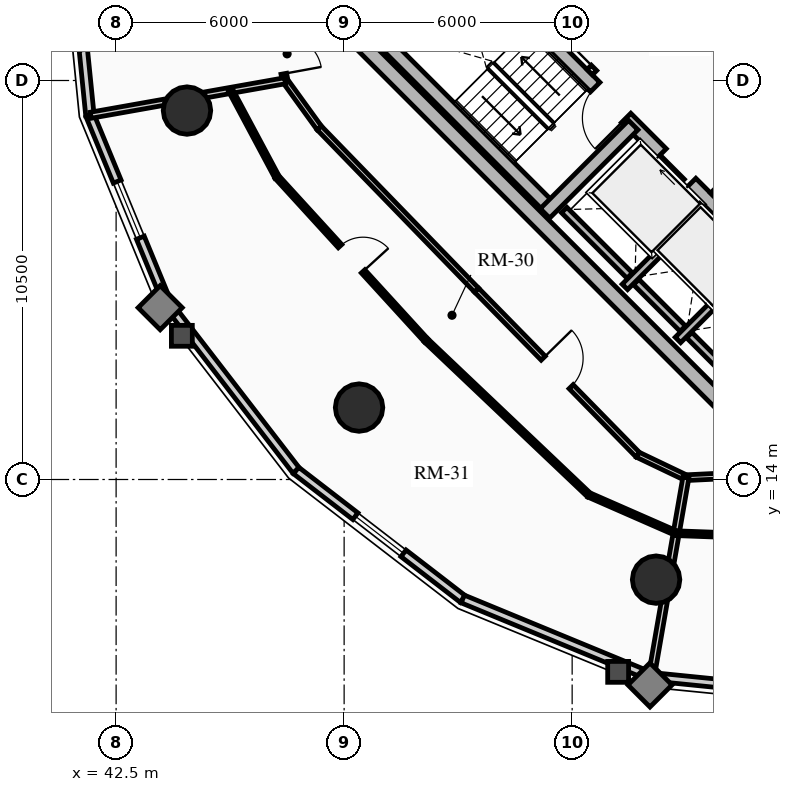
"""IFC4 building model, lengths in metres.
Left out: names, types, materials, properties, quantities, classifications, styles, units other than length and angle.
Written with IfcOpenShell. Run it as: python <this file> out.ifc"""

import sys

from ifc_helpers import new_model, si_unit, direction, frame, frame_2d, origin, origin_2d, place, context, subcontext, project, spatial, rectangle, circle, extrude, source, transform, mapped, element, fill, save


model = new_model("IFC4")
c1 = context("Model", 3, precision=1e-05, world=origin(), true_north=direction((0.0, 1.0)))
c2 = subcontext(c1, "Body", "Model", "MODEL_VIEW")
j1 = project(units=[si_unit("LENGTHUNIT", "METRE"), si_unit("PLANEANGLEUNIT", "RADIAN")], contexts=[c1])
p1 = place(None, origin())
s1 = spatial("IfcSite", under=j1, at=p1, CompositionType="ELEMENT")
p2 = place(p1, origin())
s2 = spatial("IfcBuilding", under=s1, at=p2, CompositionType="ELEMENT")
p3 = place(p2, frame((0.0, 0.0, 160.33)))
s3 = spatial("IfcBuildingStorey", under=s2, at=p3, CompositionType="ELEMENT", Elevation=160.33)
for number, where, z_axis, x_axis in (
    (1, (58.702, 15.732, 0.0), (0.0, 0.0, 1.0), (-0.707, 0.707, 0.0)),
    (2, (66.268, 23.298, 0.0), (0.0, 0.0, 1.0), (-0.707, 0.707, 0.0)),
):
    element("IfcWall", number, at=place(p3, frame(where, z_axis=z_axis, x_axis=x_axis)), inside=s3, PredefinedType="SHEAR", context=c2, shape_type="SweptSolid", body=[
        extrude(rectangle(XDim=14.1, YDim=0.4, at=frame_2d((7.05, 0.0))), origin(), (0.0, 0.0, 1.0), 2.91),
    ])
p4 = place(p3, frame((61.06, 18.373, 0.0), z_axis=(0.0, 0.0, 1.0), x_axis=(-0.707106781187, 0.707106781187, 0.0)))
e3 = element("IfcWall", 3, at=p4, inside=s3, PredefinedType="SHEAR", context=c2, shape_type="SweptSolid", body=[
    extrude(rectangle(XDim=13.7, YDim=0.35, at=frame_2d((6.85, 0.0))), origin(), (0.0, 0.0, 1.0), 2.91),
])
m1 = source(origin(), c2, "Body", "SweptSolid", [
    extrude(rectangle(XDim=1.1, YDim=2.015, at=frame_2d((0.55, 1.007))), frame((0.0, 0.185, 0.0), z_axis=(0.0, -1.0, 0.0), x_axis=(1.0, 0.0, 0.0)), (0.0, 0.0, 1.0), 0.37),
])
p5 = place(p4, frame((4.85, 0.0, 0.0)))
e4 = element("IfcOpeningElement", 4, at=p5, cuts=e3, PredefinedType="OPENING", context=c2, shape_type="MappedRepresentation", body=[
    mapped(m1, transform((0.0, 0.0, 0.0), x_axis=(1.0, 0.0, 0.0), y_axis=(0.0, 1.0, 0.0), z_axis=(0.0, 0.0, 1.0), scale=1.0)),
])
p6 = place(p4, frame((0.625, 0.0, 0.0)))
e5 = element("IfcOpeningElement", 5, at=p6, cuts=e3, PredefinedType="OPENING", context=c2, shape_type="MappedRepresentation", body=[
    mapped(m1, transform((0.0, 0.0, 0.0), x_axis=(1.0, 0.0, 0.0), y_axis=(0.0, 1.0, 0.0), z_axis=(0.0, 0.0, 1.0), scale=1.0)),
])
p7 = place(p4, frame((2.625, 0.0, 0.0)))
e6 = element("IfcOpeningElement", 6, at=p7, cuts=e3, PredefinedType="OPENING", context=c2, shape_type="MappedRepresentation", body=[
    mapped(m1, transform((0.0, 0.0, 0.0), x_axis=(1.0, 0.0, 0.0), y_axis=(0.0, 1.0, 0.0), z_axis=(0.0, 0.0, 1.0), scale=1.0)),
])
m2 = source(origin(), c2, "Body", "SweptSolid", [
    extrude(rectangle(XDim=1.15, YDim=2.02, at=frame_2d((0.575, 1.01))), frame((0.0, 0.185, 0.0), z_axis=(0.0, -1.0, 0.0), x_axis=(1.0, 0.0, 0.0)), (0.0, 0.0, 1.0), 0.37),
])
p8 = place(p4, frame((7.27, 0.0, 0.0)))
e7 = element("IfcOpeningElement", 7, at=p8, cuts=e3, PredefinedType="OPENING", context=c2, shape_type="MappedRepresentation", body=[
    mapped(m2, transform((0.0, 0.0, 0.0), x_axis=(1.0, 0.0, 0.0), y_axis=(0.0, 1.0, 0.0), z_axis=(0.0, 0.0, 1.0), scale=1.0)),
])
p9 = place(p3, frame((63.627, 20.94, 0.0), z_axis=(0.0, 0.0, 1.0), x_axis=(-0.707119496762, 0.707094065383, 0.0)))
e8 = element("IfcWall", 8, at=p9, inside=s3, PredefinedType="SHEAR", context=c2, shape_type="SweptSolid", body=[
    extrude(rectangle(XDim=9.6, YDim=0.35, at=frame_2d((4.8, 0.0))), origin(), (0.0, 0.0, 1.0), 2.91),
])
p10 = place(p9, frame((5.28, 0.0, 0.0)))
e9 = element("IfcOpeningElement", 9, at=p10, cuts=e8, PredefinedType="OPENING", context=c2, shape_type="MappedRepresentation", body=[
    mapped(m2, transform((0.0, 0.0, 0.0), x_axis=(1.0, 0.0, 0.0), y_axis=(0.0, 1.0, 0.0), z_axis=(0.0, 0.0, 1.0), scale=1.0)),
])
p11 = place(p3, frame((53.922, 21.141, 0.0), z_axis=(0.0, 0.0, 1.0), x_axis=(-0.707106781187, 0.707106781187, 0.0)))
e10 = element("IfcWall", 10, at=p11, inside=s3, PredefinedType="SHEAR", context=c2, shape_type="SweptSolid", body=[
    extrude(rectangle(XDim=6.695, YDim=0.35, at=frame_2d((3.348, 0.0))), origin(), (0.0, 0.0, 1.0), 2.91),
])
p12 = place(p3, frame((53.784, 21.003, 0.0), z_axis=(0.0, 0.0, 1.0), x_axis=(0.707106781187, 0.707106781187, 0.0)))
e11 = element("IfcWall", 11, at=p12, inside=s3, PredefinedType="SHEAR", context=c2, shape_type="SweptSolid", body=[
    extrude(rectangle(XDim=3.285, YDim=0.35, at=frame_2d((1.643, 0.0))), origin(), (0.0, 0.0, 1.0), 2.91),
])
for number, where, z_axis, x_axis in (
    (12, (44.365, 23.709, 0.0), (0.0, 0.0, 1.0), (1.0, 0.0, 0.0)),
    (13, (48.893, 15.893, 0.0), (0.0, 0.0, 1.0), (1.0, 0.0, 0.0)),
    (14, (56.709, 11.365, 0.0), (0.0, 0.0, 1.0), (1.0, 0.0, 0.0)),
):
    element("IfcColumn", number, at=place(p3, frame(where, z_axis=z_axis, x_axis=x_axis)), inside=s3, PredefinedType="USERDEFINED", context=c2, shape_type="SweptSolid", body=[
        extrude(circle(Radius=0.625, at=origin_2d()), origin(), (0.0, 0.0, 1.0), 2.91),
    ])
p13 = place(p3, frame((41.811, 23.582, 0.0), z_axis=(0.0, 0.0, 1.0), x_axis=(-0.100279889424, 0.994959267396, 0.0)))
e15 = element("IfcWall", 15, at=p13, inside=s3, PredefinedType="SOLIDWALL", context=c2, shape_type="SweptSolid", body=[
    extrude(rectangle(XDim=5.076, YDim=0.22, at=frame_2d((2.538, 0.0))), origin(), (0.0, 0.0, 1.0), 2.245),
])
m3 = source(origin(), c2, "Body", "SweptSolid", [
    extrude(rectangle(XDim=1.6, YDim=1.3, at=frame_2d((0.8, 0.65))), frame((0.0, 0.12, 0.0), z_axis=(0.0, -1.0, 0.0), x_axis=(1.0, 0.0, 0.0)), (0.0, 0.0, 1.0), 0.24),
])
p14 = place(p13, frame((1.738, 0.0, 0.65)))
e16 = element("IfcOpeningElement", 16, at=p14, cuts=e15, PredefinedType="OPENING", context=c2, shape_type="MappedRepresentation", body=[
    mapped(m3, transform((0.0, 0.0, 0.0), x_axis=(1.0, 0.0, 0.0), y_axis=(0.0, 1.0, 0.0), z_axis=(0.0, 0.0, 1.0), scale=1.0)),
])
p15 = place(p3, frame((43.856, 18.622, 0.0), z_axis=(0.0, 0.0, 1.0), x_axis=(-0.38111364655, 0.924528197738, 0.0)))
e17 = element("IfcWall", 17, at=p15, inside=s3, PredefinedType="SOLIDWALL", context=c2, shape_type="SweptSolid", body=[
    extrude(rectangle(XDim=5.366, YDim=0.22, at=frame_2d((2.683, 0.0))), origin(), (0.0, 0.0, 1.0), 2.245),
])
p16 = place(p15, frame((1.883, 0.0, 0.65)))
e18 = element("IfcOpeningElement", 18, at=p16, cuts=e17, PredefinedType="OPENING", context=c2, shape_type="MappedRepresentation", body=[
    mapped(m3, transform((0.0, 0.0, 0.0), x_axis=(1.0, 0.0, 0.0), y_axis=(0.0, 1.0, 0.0), z_axis=(0.0, 0.0, 1.0), scale=1.0)),
])
p17 = place(p3, frame((47.236, 14.236, 0.0), z_axis=(0.0, 0.0, 1.0), x_axis=(-0.610543584779, 0.791982658323, 0.0)))
e19 = element("IfcWall", 19, at=p17, inside=s3, PredefinedType="SOLIDWALL", context=c2, shape_type="SweptSolid", body=[
    extrude(rectangle(XDim=5.537, YDim=0.22, at=frame_2d((2.769, 0.0))), origin(), (0.0, 0.0, 1.0), 2.245),
])
p18 = place(p3, frame((51.622, 10.856, 0.0), z_axis=(0.0, 0.0, 1.0), x_axis=(-0.791982658323, 0.610543584779, 0.0)))
e20 = element("IfcWall", 20, at=p18, inside=s3, PredefinedType="SOLIDWALL", context=c2, shape_type="SweptSolid", body=[
    extrude(rectangle(XDim=5.537, YDim=0.22, at=frame_2d((2.769, 0.0))), origin(), (0.0, 0.0, 1.0), 2.245),
])
p19 = place(p18, frame((1.968, 0.0, 0.65)))
e21 = element("IfcOpeningElement", 21, at=p19, cuts=e20, PredefinedType="OPENING", context=c2, shape_type="MappedRepresentation", body=[
    mapped(m3, transform((0.0, 0.0, 0.0), x_axis=(1.0, 0.0, 0.0), y_axis=(0.0, 1.0, 0.0), z_axis=(0.0, 0.0, 1.0), scale=1.0)),
])
p20 = place(p3, frame((56.582, 8.811, 0.0), z_axis=(0.0, 0.0, 1.0), x_axis=(-0.924528197738, 0.38111364655, 0.0)))
e22 = element("IfcWall", 22, at=p20, inside=s3, PredefinedType="SOLIDWALL", context=c2, shape_type="SweptSolid", body=[
    extrude(rectangle(XDim=5.366, YDim=0.22, at=frame_2d((2.683, 0.0))), origin(), (0.0, 0.0, 1.0), 2.245),
])
p21 = place(p3, frame((61.633, 8.302, 0.0), z_axis=(0.0, 0.0, 1.0), x_axis=(-0.994959267396, 0.100279889424, 0.0)))
e23 = element("IfcWall", 23, at=p21, inside=s3, PredefinedType="SOLIDWALL", context=c2, shape_type="SweptSolid", body=[
    extrude(rectangle(XDim=5.076, YDim=0.22, at=frame_2d((2.538, 0.0))), origin(), (0.0, 0.0, 1.0), 2.245),
])
p22 = place(p21, frame((1.738, 0.0, 0.65)))
e24 = element("IfcOpeningElement", 24, at=p22, cuts=e23, PredefinedType="OPENING", context=c2, shape_type="MappedRepresentation", body=[
    mapped(m3, transform((0.0, 0.0, 0.0), x_axis=(1.0, 0.0, 0.0), y_axis=(0.0, 1.0, 0.0), z_axis=(0.0, 0.0, 1.0), scale=1.0)),
])
p23 = place(p3, frame((55.888, 19.069, 0.0), z_axis=(0.0, 0.0, 1.0), x_axis=(0.707106781187, 0.707106781187, 0.0)))
e25 = element("IfcWall", 25, at=p23, inside=s3, PredefinedType="SHEAR", context=c2, shape_type="SweptSolid", body=[
    extrude(rectangle(XDim=2.97, YDim=0.2, at=frame_2d((1.485, 0.0))), origin(), (0.0, 0.0, 1.0), 2.91),
])
p24 = place(p3, frame((56.015, 19.366, 0.0), z_axis=(0.0, 0.0, 1.0), x_axis=(-0.707106781187, 0.707106781187, 0.0)))
e26 = element("IfcWall", 26, at=p24, inside=s3, PredefinedType="SHEAR", context=c2, shape_type="SweptSolid", body=[
    extrude(rectangle(XDim=2.44, YDim=0.2, at=frame_2d((1.22, 0.0))), origin(), (0.0, 0.0, 1.0), 2.91),
])
p25 = place(p3, frame((57.284, 17.673, 0.0), z_axis=(0.0, 0.0, 1.0), x_axis=(0.707147878904, 0.70706568108, 0.0)))
e27 = element("IfcWall", 27, at=p25, inside=s3, PredefinedType="SHEAR", context=c2, shape_type="SweptSolid", body=[
    extrude(rectangle(XDim=2.97, YDim=0.2, at=frame_2d((1.485, 0.0))), origin(), (0.0, 0.0, 1.0), 2.91),
])
p26 = place(p3, frame((57.412, 17.97, 0.0), z_axis=(0.0, 0.0, 1.0), x_axis=(-0.707106781187, 0.707106781187, 0.0)))
e28 = element("IfcWall", 28, at=p26, inside=s3, PredefinedType="SHEAR", context=c2, shape_type="SweptSolid", body=[
    extrude(rectangle(XDim=1.735, YDim=0.2, at=frame_2d((0.867, 0.0))), origin(), (0.0, 0.0, 1.0), 2.91),
])
p27 = place(p3, frame((58.737, 16.644, 0.0), z_axis=(0.0, 0.0, 1.0), x_axis=(-0.707032117043, 0.707181437447, 0.0)))
e29 = element("IfcWall", 29, at=p27, inside=s3, PredefinedType="SHEAR", context=c2, shape_type="SweptSolid", body=[
    extrude(rectangle(XDim=1.635, YDim=0.2, at=frame_2d((0.817, 0.0))), origin(), (0.0, 0.0, 1.0), 2.91),
])
p28 = place(p3, frame((58.214, 21.467, 0.0), z_axis=(0.0, 0.0, 1.0), x_axis=(0.707106781187, 0.707106781187, 0.0)))
e30 = element("IfcWall", 30, at=p28, inside=s3, PredefinedType="PARTITIONING", context=c2, shape_type="SweptSolid", body=[
    extrude(rectangle(XDim=3.28, YDim=0.2, at=frame_2d((1.64, 0.0))), origin(), (0.0, 0.0, 1.0), 2.675),
])
m4 = source(origin(), c2, "Body", "SweptSolid", [
    extrude(rectangle(XDim=1.5, YDim=2.02, at=frame_2d((0.75, 1.01))), frame((0.0, 0.11, 0.0), z_axis=(0.0, -1.0, 0.0), x_axis=(1.0, 0.0, 0.0)), (0.0, 0.0, 1.0), 0.22),
])
p29 = place(p28, frame((1.55, 0.0, 0.0)))
e31 = element("IfcOpeningElement", 31, at=p29, cuts=e30, PredefinedType="OPENING", context=c2, shape_type="MappedRepresentation", body=[
    mapped(m4, transform((0.0, 0.0, 0.0), x_axis=(1.0, 0.0, 0.0), y_axis=(0.0, 1.0, 0.0), z_axis=(0.0, 0.0, 1.0), scale=1.0)),
])
p30 = place(p3, frame((54.961, 24.719, 0.0), z_axis=(0.0, 0.0, 1.0), x_axis=(0.707106781187, 0.707106781187, 0.0)))
e32 = element("IfcWall", 32, at=p30, inside=s3, PredefinedType="PARTITIONING", context=c2, shape_type="SweptSolid", body=[
    extrude(rectangle(XDim=3.28, YDim=0.2, at=frame_2d((1.64, 0.0))), origin(), (0.0, 0.0, 1.0), 2.675),
])
m5 = source(origin(), c2, "Body", "SweptSolid", [
    extrude(rectangle(XDim=0.9, YDim=2.005, at=frame_2d((0.45, 1.002))), frame((0.0, 0.11, 0.0), z_axis=(0.0, -1.0, 0.0), x_axis=(1.0, 0.0, 0.0)), (0.0, 0.0, 1.0), 0.22),
])
p31 = place(p30, frame((0.16, 0.0, 0.0)))
e33 = element("IfcOpeningElement", 33, at=p31, cuts=e32, PredefinedType="OPENING", context=c2, shape_type="MappedRepresentation", body=[
    mapped(m5, transform((0.0, 0.0, 0.0), x_axis=(1.0, 0.0, 0.0), y_axis=(0.0, 1.0, 0.0), z_axis=(0.0, 0.0, 1.0), scale=1.0)),
])
p32 = place(p3, frame((46.699, 25.843, 0.0), z_axis=(0.0, 0.0, 1.0), x_axis=(0.180451258011, -0.983583928032, 0.0)))
e34 = element("IfcWall", 34, at=p32, inside=s3, PredefinedType="PARTITIONING", context=c2, shape_type="SweptSolid", body=[
    extrude(rectangle(XDim=1.372, YDim=0.15, at=frame_2d((0.686, 0.0))), origin(), (0.0, 0.0, 1.0), 2.245),
])
m6 = source(origin(), c2, "Body", "SweptSolid", [
    extrude(rectangle(XDim=1.0, YDim=2.015, at=frame_2d((0.5, 1.007))), frame((0.0, 0.085, 0.0), z_axis=(0.0, -1.0, 0.0), x_axis=(1.0, 0.0, 0.0)), (0.0, 0.0, 1.0), 0.17),
])
p33 = place(p32, frame((0.186, 0.0, 0.0)))
e35 = element("IfcOpeningElement", 35, at=p33, cuts=e34, PredefinedType="OPENING", context=c2, shape_type="MappedRepresentation", body=[
    mapped(m6, transform((0.0, 0.0, 0.0), x_axis=(1.0, 0.0, 0.0), y_axis=(0.0, 1.0, 0.0), z_axis=(0.0, 0.0, 1.0), scale=1.0)),
])
p34 = place(p3, frame((46.946, 24.494, 0.0), z_axis=(0.0, 0.0, 1.0), x_axis=(0.586340262528, -0.810064871809, 0.0)))
e36 = element("IfcWall", 36, at=p34, inside=s3, PredefinedType="PARTITIONING", context=c2, shape_type="SweptSolid", body=[
    extrude(rectangle(XDim=1.531, YDim=0.15, at=frame_2d((0.766, 0.0))), origin(), (0.0, 0.0, 1.0), 2.245),
])
p35 = place(p3, frame((47.844, 23.253, 0.0), z_axis=(0.0, 0.0, 1.0), x_axis=(0.696248411352, -0.717800912293, 0.0)))
e37 = element("IfcWall", 37, at=p35, inside=s3, PredefinedType="PARTITIONING", context=c2, shape_type="SweptSolid", body=[
    extrude(rectangle(XDim=5.947, YDim=0.15, at=frame_2d((2.974, 0.0))), origin(), (0.0, 0.0, 1.0), 2.675),
])
p36 = place(p3, frame((51.985, 18.985, 0.0), z_axis=(0.0, 0.0, 1.0), x_axis=(0.699619654291, -0.714515457726, 0.0)))
e38 = element("IfcWall", 38, at=p36, inside=s3, PredefinedType="PARTITIONING", context=c2, shape_type="SweptSolid", body=[
    extrude(rectangle(XDim=6.064, YDim=0.15, at=frame_2d((3.032, 0.0))), origin(), (0.0, 0.0, 1.0), 2.245),
])
m7 = source(origin(), c2, "Body", "SweptSolid", [
    extrude(rectangle(XDim=1.05, YDim=2.015, at=frame_2d((0.525, 1.007))), frame((0.0, 0.085, 0.0), z_axis=(0.0, -1.0, 0.0), x_axis=(1.0, 0.0, 0.0)), (0.0, 0.0, 1.0), 0.17),
])
p37 = place(p36, frame((2.507, 0.0, 0.0)))
e39 = element("IfcOpeningElement", 39, at=p37, cuts=e38, PredefinedType="OPENING", context=c2, shape_type="MappedRepresentation", body=[
    mapped(m7, transform((0.0, 0.0, 0.0), x_axis=(1.0, 0.0, 0.0), y_axis=(0.0, 1.0, 0.0), z_axis=(0.0, 0.0, 1.0), scale=1.0)),
])
p38 = place(p3, frame((56.227, 14.652, 0.0), z_axis=(0.0, 0.0, 1.0), x_axis=(0.902364039563, -0.430974639745, 0.0)))
e40 = element("IfcWall", 40, at=p38, inside=s3, PredefinedType="PARTITIONING", context=c2, shape_type="SweptSolid", body=[
    extrude(rectangle(XDim=1.401, YDim=0.15, at=frame_2d((0.701, 0.0))), origin(), (0.0, 0.0, 1.0), 2.245),
])
p39 = place(p3, frame((57.492, 14.048, 0.0), z_axis=(0.0, 0.0, 1.0), x_axis=(0.99885011351, 0.047942160364, 0.0)))
e41 = element("IfcWall", 41, at=p39, inside=s3, PredefinedType="PARTITIONING", context=c2, shape_type="SweptSolid", body=[
    extrude(rectangle(XDim=1.477, YDim=0.15, at=frame_2d((0.738, 0.0))), origin(), (0.0, 0.0, 1.0), 2.245),
])
p40 = place(p3, frame((46.946, 24.494, 0.0), z_axis=(0.0, 0.0, 1.0), x_axis=(-0.984604227647, -0.174798497988, 0.0)))
e42 = element("IfcWall", 42, at=p40, inside=s3, PredefinedType="PARTITIONING", context=c2, shape_type="SweptSolid", body=[
    extrude(rectangle(XDim=5.196, YDim=0.16, at=frame_2d((2.598, 0.0))), origin(), (0.0, 0.0, 1.0), 2.245),
])
p41 = place(p3, frame((57.492, 14.048, 0.0), z_axis=(0.0, 0.0, 1.0), x_axis=(-0.171191349619, -0.985237799628, 0.0)))
e43 = element("IfcWall", 43, at=p41, inside=s3, PredefinedType="PARTITIONING", context=c2, shape_type="SweptSolid", body=[
    extrude(rectangle(XDim=5.295, YDim=0.16, at=frame_2d((2.647, 0.0))), origin(), (0.0, 0.0, 1.0), 2.245),
])
p42 = place(p3, frame((45.514, 24.239, 0.0), z_axis=(0.0, 0.0, 1.0), x_axis=(0.471225296528, -0.882012879674, 0.0)))
e44 = element("IfcWall", 44, at=p42, inside=s3, PredefinedType="PARTITIONING", context=c2, shape_type="SweptSolid", body=[
    extrude(rectangle(XDim=2.585, YDim=0.125, at=frame_2d((1.292, 0.0))), origin(), (0.0, 0.0, 1.0), 2.245),
])
p43 = place(p3, frame((46.732, 21.959, 0.0), z_axis=(0.0, 0.0, 1.0), x_axis=(0.674328014222, -0.738431939474, 0.0)))
e45 = element("IfcWall", 45, at=p43, inside=s3, PredefinedType="PARTITIONING", context=c2, shape_type="SweptSolid", body=[
    extrude(rectangle(XDim=5.823, YDim=0.125, at=frame_2d((2.912, 0.0))), origin(), (0.0, 0.0, 1.0), 2.675),
])
m8 = source(origin(), c2, "Body", "SweptSolid", [
    extrude(rectangle(XDim=0.9, YDim=2.005, at=frame_2d((0.45, 1.002))), frame((0.0, 0.073, 0.0), z_axis=(0.0, -1.0, 0.0), x_axis=(1.0, 0.0, 0.0)), (0.0, 0.0, 1.0), 0.145),
])
p44 = place(p43, frame((2.462, 0.0, 0.0)))
e46 = element("IfcOpeningElement", 46, at=p44, cuts=e45, PredefinedType="OPENING", context=c2, shape_type="MappedRepresentation", body=[
    mapped(m8, transform((0.0, 0.0, 0.0), x_axis=(1.0, 0.0, 0.0), y_axis=(0.0, 1.0, 0.0), z_axis=(0.0, 0.0, 1.0), scale=1.0)),
])
p45 = place(p3, frame((50.659, 17.659, 0.0), z_axis=(0.0, 0.0, 1.0), x_axis=(0.72516873678, -0.688571204159, 0.0)))
e47 = element("IfcWall", 47, at=p45, inside=s3, PredefinedType="PARTITIONING", context=c2, shape_type="SweptSolid", body=[
    extrude(rectangle(XDim=5.904, YDim=0.125, at=frame_2d((2.952, 0.0))), origin(), (0.0, 0.0, 1.0), 2.245),
])
p46 = place(p3, frame((54.94, 13.594, 0.0), z_axis=(0.0, 0.0, 1.0), x_axis=(0.915898070967, -0.401410916143, 0.0)))
e48 = element("IfcWall", 48, at=p46, inside=s3, PredefinedType="PARTITIONING", context=c2, shape_type="SweptSolid", body=[
    extrude(rectangle(XDim=2.509, YDim=0.125, at=frame_2d((1.254, 0.0))), origin(), (0.0, 0.0, 1.0), 2.245),
])
p47 = place(p3, frame((57.238, 12.587, 0.0), z_axis=(0.0, 0.0, 1.0), x_axis=(0.999316318576, -0.036971548882, 0.0)))
e49 = element("IfcWall", 49, at=p47, inside=s3, PredefinedType="PARTITIONING", context=c2, shape_type="SweptSolid", body=[
    extrude(rectangle(XDim=2.476, YDim=0.125, at=frame_2d((1.238, 0.0))), origin(), (0.0, 0.0, 1.0), 2.245),
])
m9 = source(origin(), c2, "Body", "SweptSolid", [
    extrude(rectangle(XDim=1.6, YDim=1.3, at=frame_2d((0.8, 0.65))), frame((0.0, 0.03, 0.0), z_axis=(0.0, -1.0, 0.0), x_axis=(1.0, 0.0, 0.0)), (0.0, 0.0, 1.0), 0.06),
])
p48 = place(p16, origin())
e50 = element("IfcWindow", 50, at=p48, inside=s3, PartitioningType="SINGLE_PANEL", PredefinedType="WINDOW", context=c2, shape_type="MappedRepresentation", body=[
    mapped(m9, transform((0.0, 0.0, 0.0), x_axis=(1.0, 0.0, 0.0), y_axis=(0.0, 1.0, 0.0), z_axis=(0.0, 0.0, 1.0), scale=1.0)),
])
fill(e18, e50)
p49 = place(p19, origin())
e51 = element("IfcWindow", 51, at=p49, inside=s3, PartitioningType="SINGLE_PANEL", PredefinedType="WINDOW", context=c2, shape_type="MappedRepresentation", body=[
    mapped(m9, transform((0.0, 0.0, 0.0), x_axis=(1.0, 0.0, 0.0), y_axis=(0.0, 1.0, 0.0), z_axis=(0.0, 0.0, 1.0), scale=1.0)),
])
fill(e21, e51)
m10 = source(origin(), c2, "Body", "SweptSolid", [
    extrude(rectangle(XDim=1.1, YDim=2.015, at=frame_2d((0.55, 1.007))), frame((0.0, 0.025, 0.0), z_axis=(0.0, -1.0, 0.0), x_axis=(1.0, 0.0, 0.0)), (0.0, 0.0, 1.0), 0.05),
])
p50 = place(p5, origin())
e52 = element("IfcDoor", 52, at=p50, inside=s3, OperationType="SLIDING_TO_RIGHT", PredefinedType="DOOR", context=c2, shape_type="MappedRepresentation", body=[
    mapped(m10, transform((0.0, 0.0, 0.0), x_axis=(1.0, 0.0, 0.0), y_axis=(0.0, 1.0, 0.0), z_axis=(0.0, 0.0, 1.0), scale=1.0)),
])
fill(e4, e52)
m11 = source(origin(), c2, "Body", "SweptSolid", [
    extrude(rectangle(XDim=1.15, YDim=2.02, at=frame_2d((0.575, 1.01))), frame((0.0, 0.025, 0.0), z_axis=(0.0, -1.0, 0.0), x_axis=(1.0, 0.0, 0.0)), (0.0, 0.0, 1.0), 0.05),
])
p51 = place(p8, origin())
e53 = element("IfcDoor", 53, at=p51, inside=s3, OperationType="SINGLE_SWING_LEFT", PredefinedType="DOOR", context=c2, shape_type="MappedRepresentation", body=[
    mapped(m11, transform((0.0, 0.0, 0.0), x_axis=(1.0, 0.0, 0.0), y_axis=(0.0, 1.0, 0.0), z_axis=(0.0, 0.0, 1.0), scale=1.0)),
])
fill(e7, e53)
m12 = source(origin(), c2, "Body", "SweptSolid", [
    extrude(rectangle(XDim=0.9, YDim=2.005, at=frame_2d((0.45, 1.002))), frame((0.0, 0.025, 0.0), z_axis=(0.0, -1.0, 0.0), x_axis=(1.0, 0.0, 0.0)), (0.0, 0.0, 1.0), 0.05),
])
p52 = place(p31, origin())
e54 = element("IfcDoor", 54, at=p52, inside=s3, OperationType="SINGLE_SWING_LEFT", PredefinedType="DOOR", context=c2, shape_type="MappedRepresentation", body=[
    mapped(m12, transform((0.0, 0.0, 0.0), x_axis=(1.0, 0.0, 0.0), y_axis=(0.0, 1.0, 0.0), z_axis=(0.0, 0.0, 1.0), scale=1.0)),
])
fill(e33, e54)
m13 = source(origin(), c2, "Body", "SweptSolid", [
    extrude(rectangle(XDim=1.0, YDim=2.015, at=frame_2d((0.5, 1.007))), frame((0.0, 0.025, 0.0), z_axis=(0.0, -1.0, 0.0), x_axis=(1.0, 0.0, 0.0)), (0.0, 0.0, 1.0), 0.05),
])
p53 = place(p33, origin())
e55 = element("IfcDoor", 55, at=p53, inside=s3, OperationType="SINGLE_SWING_RIGHT", PredefinedType="DOOR", context=c2, shape_type="MappedRepresentation", body=[
    mapped(m13, transform((0.0, 0.0, 0.0), x_axis=(1.0, 0.0, 0.0), y_axis=(0.0, 1.0, 0.0), z_axis=(0.0, 0.0, 1.0), scale=1.0)),
])
fill(e35, e55)
m14 = source(origin(), c2, "Body", "SweptSolid", [
    extrude(rectangle(XDim=1.05, YDim=2.015, at=frame_2d((0.525, 1.007))), frame((0.0, 0.025, 0.0), z_axis=(0.0, -1.0, 0.0), x_axis=(1.0, 0.0, 0.0)), (0.0, 0.0, 1.0), 0.05),
])
p54 = place(p37, origin())
e56 = element("IfcDoor", 56, at=p54, inside=s3, OperationType="SINGLE_SWING_LEFT", PredefinedType="DOOR", context=c2, shape_type="MappedRepresentation", body=[
    mapped(m14, transform((0.0, 0.0, 0.0), x_axis=(1.0, 0.0, 0.0), y_axis=(0.0, 1.0, 0.0), z_axis=(0.0, 0.0, 1.0), scale=1.0)),
])
fill(e39, e56)
p55 = place(p44, origin())
e57 = element("IfcDoor", 57, at=p55, inside=s3, OperationType="SINGLE_SWING_RIGHT", PredefinedType="DOOR", context=c2, shape_type="MappedRepresentation", body=[
    mapped(m12, transform((0.0, 0.0, 0.0), x_axis=(1.0, 0.0, 0.0), y_axis=(0.0, 1.0, 0.0), z_axis=(0.0, 0.0, 1.0), scale=1.0)),
])
fill(e46, e57)
save(model, sys.argv[1])
